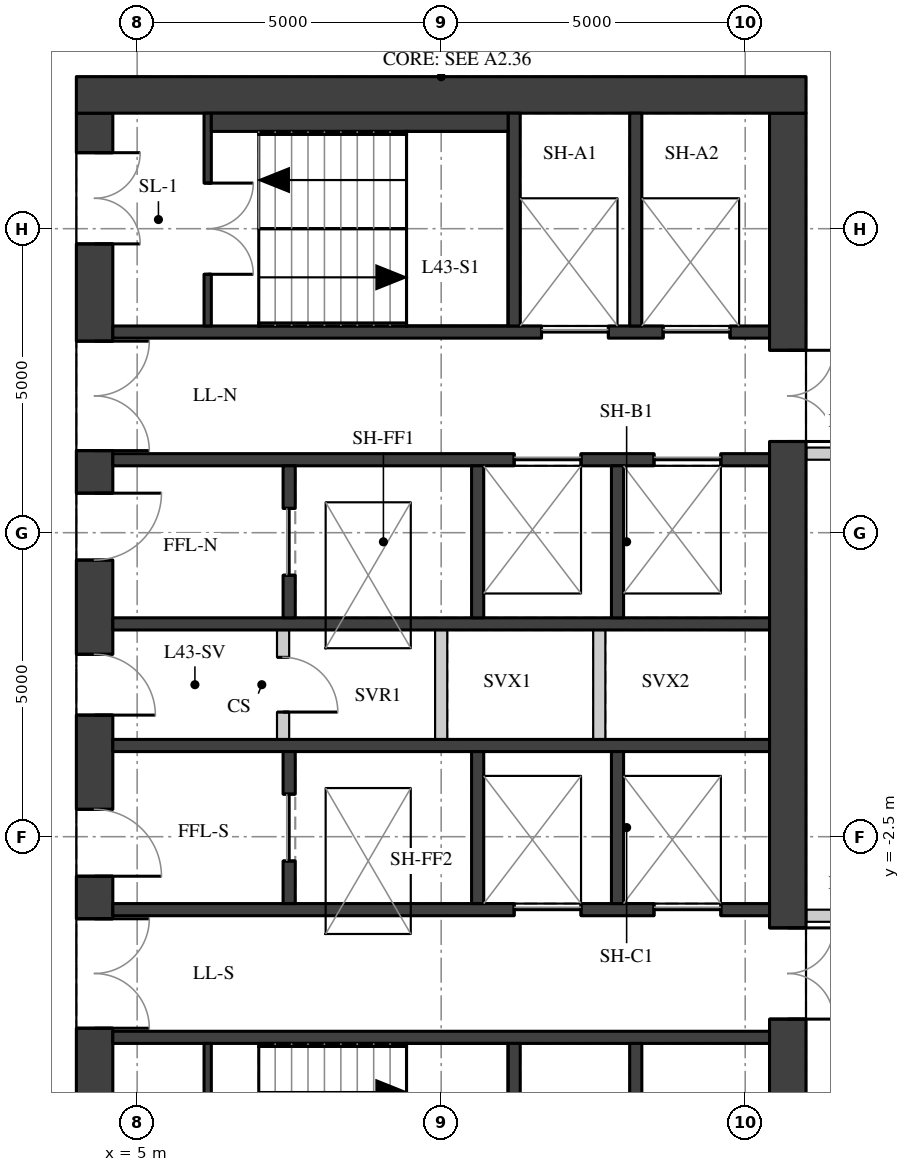
"""IFC4 building model, lengths in metres.
Left out: names, types, materials, properties, quantities, classifications, styles, units other than length and angle.
Written with IfcOpenShell. Run it as: python <this file> out.ifc"""

import sys

from ifc_helpers import new_model, si_unit, direction, frame, frame_2d, origin, place, context, subcontext, project, spatial, rectangle, extrude, element, fill, save


model = new_model("IFC4")
c1 = context("Model", 3, precision=1e-05, world=origin(), true_north=direction((0.0, 1.0)))
c2 = subcontext(c1, "Body", "Model", "MODEL_VIEW")
j1 = project(units=[si_unit("LENGTHUNIT", "METRE"), si_unit("PLANEANGLEUNIT", "RADIAN")], contexts=[c1])
p1 = place(None, origin())
s1 = spatial("IfcSite", under=j1, at=p1, CompositionType="ELEMENT")
p2 = place(p1, origin())
s2 = spatial("IfcBuilding", under=s1, at=p2, CompositionType="ELEMENT")
p3 = place(p2, frame((0.0, 0.0, 155.0)))
s3 = spatial("IfcBuildingStorey", under=s2, at=p3, CompositionType="ELEMENT", Elevation=155.0)
p4 = place(p3, frame((4.3, -9.4, 0.0), z_axis=(0.0, 0.0, 1.0), x_axis=(0.0, 1.0, 0.0)))
e1 = element("IfcWall", 1, at=p4, inside=s3, PredefinedType="SHEAR", context=c2, shape_type="SweptSolid", body=[
    extrude(rectangle(XDim=18.8, YDim=0.6, at=frame_2d((9.4, 0.0))), origin(), (0.0, 0.0, 1.0), 3.02),
])
p5 = place(p4, frame((0.65, 0.0, 0.0)))
e2 = element("IfcOpeningElement", 2, at=p5, cuts=e1, PredefinedType="OPENING", context=c2, shape_type="SweptSolid", body=[
    extrude(rectangle(XDim=1.5, YDim=2.1, at=frame_2d((0.75, 1.05))), frame((0.0, 0.31, 0.0), z_axis=(0.0, -1.0, 0.0), x_axis=(1.0, 0.0, 0.0)), (0.0, 0.0, 1.0), 0.62),
])
p6 = place(p4, frame((3.75, 0.0, 0.0)))
e3 = element("IfcOpeningElement", 3, at=p6, cuts=e1, PredefinedType="OPENING", context=c2, shape_type="SweptSolid", body=[
    extrude(rectangle(XDim=1.8, YDim=2.1, at=frame_2d((0.9, 1.05))), frame((0.0, 0.31, 0.0), z_axis=(0.0, -1.0, 0.0), x_axis=(1.0, 0.0, 0.0)), (0.0, 0.0, 1.0), 0.62),
])
p7 = place(p4, frame((6.25, 0.0, 0.0)))
e4 = element("IfcOpeningElement", 4, at=p7, cuts=e1, PredefinedType="OPENING", context=c2, shape_type="SweptSolid", body=[
    extrude(rectangle(XDim=1.1, YDim=2.1, at=frame_2d((0.55, 1.05))), frame((0.0, 0.31, 0.0), z_axis=(0.0, -1.0, 0.0), x_axis=(1.0, 0.0, 0.0)), (0.0, 0.0, 1.0), 0.62),
])
p8 = place(p4, frame((8.9, 0.0, 0.0)))
e5 = element("IfcOpeningElement", 5, at=p8, cuts=e1, PredefinedType="OPENING", context=c2, shape_type="SweptSolid", body=[
    extrude(rectangle(XDim=1.0, YDim=2.1, at=frame_2d((0.5, 1.05))), frame((0.0, 0.31, 0.0), z_axis=(0.0, -1.0, 0.0), x_axis=(1.0, 0.0, 0.0)), (0.0, 0.0, 1.0), 0.62),
])
p9 = place(p4, frame((11.45, 0.0, 0.0)))
e6 = element("IfcOpeningElement", 6, at=p9, cuts=e1, PredefinedType="OPENING", context=c2, shape_type="SweptSolid", body=[
    extrude(rectangle(XDim=1.1, YDim=2.1, at=frame_2d((0.55, 1.05))), frame((0.0, 0.31, 0.0), z_axis=(0.0, -1.0, 0.0), x_axis=(1.0, 0.0, 0.0)), (0.0, 0.0, 1.0), 0.62),
])
p10 = place(p4, frame((13.25, 0.0, 0.0)))
e7 = element("IfcOpeningElement", 7, at=p10, cuts=e1, PredefinedType="OPENING", context=c2, shape_type="SweptSolid", body=[
    extrude(rectangle(XDim=1.8, YDim=2.1, at=frame_2d((0.9, 1.05))), frame((0.0, 0.31, 0.0), z_axis=(0.0, -1.0, 0.0), x_axis=(1.0, 0.0, 0.0)), (0.0, 0.0, 1.0), 0.62),
])
p11 = place(p4, frame((16.65, 0.0, 0.0)))
e8 = element("IfcOpeningElement", 8, at=p11, cuts=e1, PredefinedType="OPENING", context=c2, shape_type="SweptSolid", body=[
    extrude(rectangle(XDim=1.5, YDim=2.1, at=frame_2d((0.75, 1.05))), frame((0.0, 0.31, 0.0), z_axis=(0.0, -1.0, 0.0), x_axis=(1.0, 0.0, 0.0)), (0.0, 0.0, 1.0), 0.62),
])
p12 = place(p3, frame((15.7, -9.4, 0.0), z_axis=(0.0, 0.0, 1.0), x_axis=(0.0, 1.0, 0.0)))
e9 = element("IfcWall", 9, at=p12, inside=s3, PredefinedType="SHEAR", context=c2, shape_type="SweptSolid", body=[
    extrude(rectangle(XDim=18.8, YDim=0.6, at=frame_2d((9.4, 0.0))), origin(), (0.0, 0.0, 1.0), 3.02),
])
p13 = place(p12, frame((13.4, 0.0, 0.0)))
e10 = element("IfcOpeningElement", 10, at=p13, cuts=e9, PredefinedType="OPENING", context=c2, shape_type="SweptSolid", body=[
    extrude(rectangle(XDim=1.5, YDim=2.1, at=frame_2d((0.75, 1.05))), frame((0.0, 0.31, 0.0), z_axis=(0.0, -1.0, 0.0), x_axis=(1.0, 0.0, 0.0)), (0.0, 0.0, 1.0), 0.62),
])
p14 = place(p12, frame((3.9, 0.0, 0.0)))
e11 = element("IfcOpeningElement", 11, at=p14, cuts=e9, PredefinedType="OPENING", context=c2, shape_type="SweptSolid", body=[
    extrude(rectangle(XDim=1.5, YDim=2.1, at=frame_2d((0.75, 1.05))), frame((0.0, 0.31, 0.0), z_axis=(0.0, -1.0, 0.0), x_axis=(1.0, 0.0, 0.0)), (0.0, 0.0, 1.0), 0.62),
])
p15 = place(p3, frame((4.0, 9.7, 0.0), z_axis=(0.0, 0.0, 1.0), x_axis=(1.0, 0.0, 0.0)))
e12 = element("IfcWall", 12, at=p15, inside=s3, PredefinedType="SHEAR", context=c2, shape_type="SweptSolid", body=[
    extrude(rectangle(XDim=12.0, YDim=0.6, at=frame_2d((6.0, 0.0))), origin(), (0.0, 0.0, 1.0), 3.02),
])
p16 = place(p3, frame((4.6, 5.8, 0.0), z_axis=(0.0, 0.0, 1.0), x_axis=(1.0, 0.0, 0.0)))
e13 = element("IfcWall", 13, at=p16, inside=s3, PredefinedType="SHEAR", context=c2, shape_type="SweptSolid", body=[
    extrude(rectangle(XDim=10.8, YDim=0.2, at=frame_2d((5.4, 0.0))), origin(), (0.0, 0.0, 1.0), 3.02),
])
p17 = place(p16, frame((7.05, 0.0, 0.0)))
e14 = element("IfcOpeningElement", 14, at=p17, cuts=e13, PredefinedType="OPENING", context=c2, shape_type="SweptSolid", body=[
    extrude(rectangle(XDim=1.1, YDim=2.1, at=frame_2d((0.55, 1.05))), frame((0.0, 0.11, 0.0), z_axis=(0.0, -1.0, 0.0), x_axis=(1.0, 0.0, 0.0)), (0.0, 0.0, 1.0), 0.22),
])
p18 = place(p16, frame((9.05, 0.0, 0.0)))
e15 = element("IfcOpeningElement", 15, at=p18, cuts=e13, PredefinedType="OPENING", context=c2, shape_type="SweptSolid", body=[
    extrude(rectangle(XDim=1.1, YDim=2.1, at=frame_2d((0.55, 1.05))), frame((0.0, 0.11, 0.0), z_axis=(0.0, -1.0, 0.0), x_axis=(1.0, 0.0, 0.0)), (0.0, 0.0, 1.0), 0.22),
])
p19 = place(p3, frame((4.6, 3.7, 0.0), z_axis=(0.0, 0.0, 1.0), x_axis=(1.0, 0.0, 0.0)))
e16 = element("IfcWall", 16, at=p19, inside=s3, PredefinedType="SHEAR", context=c2, shape_type="SweptSolid", body=[
    extrude(rectangle(XDim=10.8, YDim=0.2, at=frame_2d((5.4, 0.0))), origin(), (0.0, 0.0, 1.0), 3.02),
])
p20 = place(p19, frame((6.6, 0.0, 0.0)))
e17 = element("IfcOpeningElement", 17, at=p20, cuts=e16, PredefinedType="OPENING", context=c2, shape_type="SweptSolid", body=[
    extrude(rectangle(XDim=1.1, YDim=2.1, at=frame_2d((0.55, 1.05))), frame((0.0, 0.11, 0.0), z_axis=(0.0, -1.0, 0.0), x_axis=(1.0, 0.0, 0.0)), (0.0, 0.0, 1.0), 0.22),
])
p21 = place(p19, frame((8.9, 0.0, 0.0)))
e18 = element("IfcOpeningElement", 18, at=p21, cuts=e16, PredefinedType="OPENING", context=c2, shape_type="SweptSolid", body=[
    extrude(rectangle(XDim=1.1, YDim=2.1, at=frame_2d((0.55, 1.05))), frame((0.0, 0.11, 0.0), z_axis=(0.0, -1.0, 0.0), x_axis=(1.0, 0.0, 0.0)), (0.0, 0.0, 1.0), 0.22),
])
for number, where, z_axis, x_axis in (
    (19, (4.6, 1.0, 0.0), (0.0, 0.0, 1.0), (1.0, 0.0, 0.0)),
    (20, (4.6, -1.0, 0.0), (0.0, 0.0, 1.0), (1.0, 0.0, 0.0)),
):
    element("IfcWall", number, at=place(p3, frame(where, z_axis=z_axis, x_axis=x_axis)), inside=s3, PredefinedType="SHEAR", context=c2, shape_type="SweptSolid", body=[
        extrude(rectangle(XDim=10.8, YDim=0.2, at=frame_2d((5.4, 0.0))), origin(), (0.0, 0.0, 1.0), 3.02),
    ])
p22 = place(p3, frame((4.6, -3.7, 0.0), z_axis=(0.0, 0.0, 1.0), x_axis=(1.0, 0.0, 0.0)))
e21 = element("IfcWall", 21, at=p22, inside=s3, PredefinedType="SHEAR", context=c2, shape_type="SweptSolid", body=[
    extrude(rectangle(XDim=10.8, YDim=0.2, at=frame_2d((5.4, 0.0))), origin(), (0.0, 0.0, 1.0), 3.02),
])
p23 = place(p22, frame((6.6, 0.0, 0.0)))
e22 = element("IfcOpeningElement", 22, at=p23, cuts=e21, PredefinedType="OPENING", context=c2, shape_type="SweptSolid", body=[
    extrude(rectangle(XDim=1.1, YDim=2.1, at=frame_2d((0.55, 1.05))), frame((0.0, 0.11, 0.0), z_axis=(0.0, -1.0, 0.0), x_axis=(1.0, 0.0, 0.0)), (0.0, 0.0, 1.0), 0.22),
])
p24 = place(p22, frame((8.9, 0.0, 0.0)))
e23 = element("IfcOpeningElement", 23, at=p24, cuts=e21, PredefinedType="OPENING", context=c2, shape_type="SweptSolid", body=[
    extrude(rectangle(XDim=1.1, YDim=2.1, at=frame_2d((0.55, 1.05))), frame((0.0, 0.11, 0.0), z_axis=(0.0, -1.0, 0.0), x_axis=(1.0, 0.0, 0.0)), (0.0, 0.0, 1.0), 0.22),
])
p25 = place(p3, frame((4.6, -5.8, 0.0), z_axis=(0.0, 0.0, 1.0), x_axis=(1.0, 0.0, 0.0)))
e24 = element("IfcWall", 24, at=p25, inside=s3, PredefinedType="SHEAR", context=c2, shape_type="SweptSolid", body=[
    extrude(rectangle(XDim=10.8, YDim=0.2, at=frame_2d((5.4, 0.0))), origin(), (0.0, 0.0, 1.0), 3.02),
])
for number, where, z_axis, x_axis in (
    (25, (11.2, 5.9, 0.0), (0.0, 0.0, 1.0), (0.0, 1.0, 0.0)),
    (26, (11.2, -9.4, 0.0), (0.0, 0.0, 1.0), (0.0, 1.0, 0.0)),
    (27, (13.2, 5.9, 0.0), (0.0, 0.0, 1.0), (0.0, 1.0, 0.0)),
    (28, (13.2, -9.4, 0.0), (0.0, 0.0, 1.0), (0.0, 1.0, 0.0)),
):
    element("IfcWall", number, at=place(p3, frame(where, z_axis=z_axis, x_axis=x_axis)), inside=s3, PredefinedType="SHEAR", context=c2, shape_type="SweptSolid", body=[
        extrude(rectangle(XDim=3.5, YDim=0.2, at=frame_2d((1.75, 0.0))), origin(), (0.0, 0.0, 1.0), 3.02),
    ])
p26 = place(p3, frame((7.5, 1.1, 0.0), z_axis=(0.0, 0.0, 1.0), x_axis=(0.0, 1.0, 0.0)))
e29 = element("IfcWall", 29, at=p26, inside=s3, PredefinedType="SHEAR", context=c2, shape_type="SweptSolid", body=[
    extrude(rectangle(XDim=2.5, YDim=0.2, at=frame_2d((1.25, 0.0))), origin(), (0.0, 0.0, 1.0), 3.02),
])
p27 = place(p26, frame((0.7, 0.0, 0.0)))
e30 = element("IfcOpeningElement", 30, at=p27, cuts=e29, PredefinedType="OPENING", context=c2, shape_type="SweptSolid", body=[
    extrude(rectangle(XDim=1.1, YDim=2.1, at=frame_2d((0.55, 1.05))), frame((0.0, 0.11, 0.0), z_axis=(0.0, -1.0, 0.0), x_axis=(1.0, 0.0, 0.0)), (0.0, 0.0, 1.0), 0.22),
])
p28 = place(p3, frame((7.5, -3.6, 0.0), z_axis=(0.0, 0.0, 1.0), x_axis=(0.0, 1.0, 0.0)))
e31 = element("IfcWall", 31, at=p28, inside=s3, PredefinedType="SHEAR", context=c2, shape_type="SweptSolid", body=[
    extrude(rectangle(XDim=2.5, YDim=0.2, at=frame_2d((1.25, 0.0))), origin(), (0.0, 0.0, 1.0), 3.02),
])
p29 = place(p28, frame((0.7, 0.0, 0.0)))
e32 = element("IfcOpeningElement", 32, at=p29, cuts=e31, PredefinedType="OPENING", context=c2, shape_type="SweptSolid", body=[
    extrude(rectangle(XDim=1.1, YDim=2.1, at=frame_2d((0.55, 1.05))), frame((0.0, 0.11, 0.0), z_axis=(0.0, -1.0, 0.0), x_axis=(1.0, 0.0, 0.0)), (0.0, 0.0, 1.0), 0.22),
])
for number, where, z_axis, x_axis in (
    (33, (10.6, 1.1, 0.0), (0.0, 0.0, 1.0), (0.0, 1.0, 0.0)),
    (34, (10.6, -3.6, 0.0), (0.0, 0.0, 1.0), (0.0, 1.0, 0.0)),
    (35, (12.9, 1.1, 0.0), (0.0, 0.0, 1.0), (0.0, 1.0, 0.0)),
    (36, (12.9, -3.6, 0.0), (0.0, 0.0, 1.0), (0.0, 1.0, 0.0)),
):
    element("IfcWall", number, at=place(p3, frame(where, z_axis=z_axis, x_axis=x_axis)), inside=s3, PredefinedType="SHEAR", context=c2, shape_type="SweptSolid", body=[
        extrude(rectangle(XDim=2.5, YDim=0.2, at=frame_2d((1.25, 0.0))), origin(), (0.0, 0.0, 1.0), 3.02),
    ])
p30 = place(p3, frame((6.16, 5.9, 0.0), z_axis=(0.0, 0.0, 1.0), x_axis=(0.0, 1.0, 0.0)))
e37 = element("IfcWall", 37, at=p30, inside=s3, PredefinedType="SHEAR", context=c2, shape_type="SweptSolid", body=[
    extrude(rectangle(XDim=3.5, YDim=0.12, at=frame_2d((1.75, 0.0))), origin(), (0.0, 0.0, 1.0), 3.02),
])
p31 = place(p30, frame((0.85, 0.0, 0.0)))
e38 = element("IfcOpeningElement", 38, at=p31, cuts=e37, PredefinedType="OPENING", context=c2, shape_type="SweptSolid", body=[
    extrude(rectangle(XDim=1.5, YDim=2.1, at=frame_2d((0.75, 1.05))), frame((0.0, 0.07, 0.0), z_axis=(0.0, -1.0, 0.0), x_axis=(1.0, 0.0, 0.0)), (0.0, 0.0, 1.0), 0.14),
])
p32 = place(p3, frame((6.16, -9.4, 0.0), z_axis=(0.0, 0.0, 1.0), x_axis=(0.0, 1.0, 0.0)))
e39 = element("IfcWall", 39, at=p32, inside=s3, PredefinedType="SHEAR", context=c2, shape_type="SweptSolid", body=[
    extrude(rectangle(XDim=3.5, YDim=0.12, at=frame_2d((1.75, 0.0))), origin(), (0.0, 0.0, 1.0), 3.02),
])
p33 = place(p32, frame((1.15, 0.0, 0.0)))
e40 = element("IfcOpeningElement", 40, at=p33, cuts=e39, PredefinedType="OPENING", context=c2, shape_type="SweptSolid", body=[
    extrude(rectangle(XDim=1.5, YDim=2.1, at=frame_2d((0.75, 1.05))), frame((0.0, 0.07, 0.0), z_axis=(0.0, -1.0, 0.0), x_axis=(1.0, 0.0, 0.0)), (0.0, 0.0, 1.0), 0.14),
])
p34 = place(p3, frame((7.4, -0.9, 0.0), z_axis=(0.0, 0.0, 1.0), x_axis=(0.0, 1.0, 0.0)))
e41 = element("IfcWall", 41, at=p34, inside=s3, PredefinedType="PARTITIONING", context=c2, shape_type="SweptSolid", body=[
    extrude(rectangle(XDim=1.8, YDim=0.2, at=frame_2d((0.9, 0.0))), origin(), (0.0, 0.0, 1.0), 3.02),
])
p35 = place(p34, frame((0.45, 0.0, 0.0)))
e42 = element("IfcOpeningElement", 42, at=p35, cuts=e41, PredefinedType="OPENING", context=c2, shape_type="SweptSolid", body=[
    extrude(rectangle(XDim=0.9, YDim=2.1, at=frame_2d((0.45, 1.05))), frame((0.0, 0.11, 0.0), z_axis=(0.0, -1.0, 0.0), x_axis=(1.0, 0.0, 0.0)), (0.0, 0.0, 1.0), 0.22),
])
for number, where, z_axis, x_axis in (
    (43, (10.0, -0.9, 0.0), (0.0, 0.0, 1.0), (0.0, 1.0, 0.0)),
    (44, (12.6, -0.9, 0.0), (0.0, 0.0, 1.0), (0.0, 1.0, 0.0)),
):
    element("IfcWall", number, at=place(p3, frame(where, z_axis=z_axis, x_axis=x_axis)), inside=s3, PredefinedType="PARTITIONING", context=c2, shape_type="SweptSolid", body=[
        extrude(rectangle(XDim=1.8, YDim=0.2, at=frame_2d((0.9, 0.0))), origin(), (0.0, 0.0, 1.0), 3.02),
    ])
p36 = place(p3, frame((6.22, 9.25, 0.0), z_axis=(0.0, 0.0, 1.0), x_axis=(1.0, 0.0, 0.0)))
e45 = element("IfcWall", 45, at=p36, inside=s3, PredefinedType="PARTITIONING", context=c2, shape_type="SweptSolid", body=[
    extrude(rectangle(XDim=4.88, YDim=0.3, at=frame_2d((2.44, 0.0))), origin(), (0.0, 0.0, 1.0), 3.02),
])
for number, where, z_axis, x_axis in (
    (46, (17.6, 3.8, 0.0), (0.0, 0.0, 1.0), (-1.0, 0.0, 0.0)),
    (47, (16.004, -3.8, 0.0), (0.0, 0.0, 1.0), (1.0, 0.0, 0.0)),
):
    element("IfcWall", number, at=place(p3, frame(where, z_axis=z_axis, x_axis=x_axis)), inside=s3, PredefinedType="PARTITIONING", context=c2, shape_type="SweptSolid", body=[
        extrude(rectangle(XDim=1.596, YDim=0.2, at=frame_2d((0.798, 0.0))), origin(), (0.0, 0.0, 1.0), 2.57),
    ])
p37 = place(p6, origin())
e48 = element("IfcDoor", 48, at=p37, inside=s3, OperationType="DOUBLE_DOOR_SINGLE_SWING", PredefinedType="DOOR", context=c2, shape_type="SweptSolid", body=[
    extrude(rectangle(XDim=1.8, YDim=2.1, at=frame_2d((0.9, 1.05))), frame((0.0, 0.025, 0.0), z_axis=(0.0, -1.0, 0.0), x_axis=(1.0, 0.0, 0.0)), (0.0, 0.0, 1.0), 0.05),
])
fill(e3, e48)
p38 = place(p7, origin())
e49 = element("IfcDoor", 49, at=p38, inside=s3, OperationType="SINGLE_SWING_RIGHT", PredefinedType="DOOR", context=c2, shape_type="SweptSolid", body=[
    extrude(rectangle(XDim=1.1, YDim=2.1, at=frame_2d((0.55, 1.05))), frame((0.0, 0.025, 0.0), z_axis=(0.0, -1.0, 0.0), x_axis=(1.0, 0.0, 0.0)), (0.0, 0.0, 1.0), 0.05),
])
fill(e4, e49)
p39 = place(p8, origin())
e50 = element("IfcDoor", 50, at=p39, inside=s3, OperationType="SINGLE_SWING_RIGHT", PredefinedType="DOOR", context=c2, shape_type="SweptSolid", body=[
    extrude(rectangle(XDim=1.0, YDim=2.1, at=frame_2d((0.5, 1.05))), frame((0.0, 0.025, 0.0), z_axis=(0.0, -1.0, 0.0), x_axis=(1.0, 0.0, 0.0)), (0.0, 0.0, 1.0), 0.05),
])
fill(e5, e50)
p40 = place(p9, origin())
e51 = element("IfcDoor", 51, at=p40, inside=s3, OperationType="SINGLE_SWING_LEFT", PredefinedType="DOOR", context=c2, shape_type="SweptSolid", body=[
    extrude(rectangle(XDim=1.1, YDim=2.1, at=frame_2d((0.55, 1.05))), frame((0.0, 0.025, 0.0), z_axis=(0.0, -1.0, 0.0), x_axis=(1.0, 0.0, 0.0)), (0.0, 0.0, 1.0), 0.05),
])
fill(e6, e51)
p41 = place(p10, origin())
e52 = element("IfcDoor", 52, at=p41, inside=s3, OperationType="DOUBLE_DOOR_SINGLE_SWING", PredefinedType="DOOR", context=c2, shape_type="SweptSolid", body=[
    extrude(rectangle(XDim=1.8, YDim=2.1, at=frame_2d((0.9, 1.05))), frame((0.0, 0.025, 0.0), z_axis=(0.0, -1.0, 0.0), x_axis=(1.0, 0.0, 0.0)), (0.0, 0.0, 1.0), 0.05),
])
fill(e7, e52)
p42 = place(p11, origin())
e53 = element("IfcDoor", 53, at=p42, inside=s3, OperationType="DOUBLE_DOOR_SINGLE_SWING", PredefinedType="DOOR", context=c2, shape_type="SweptSolid", body=[
    extrude(rectangle(XDim=1.5, YDim=2.1, at=frame_2d((0.75, 1.05))), frame((0.0, 0.025, 0.0), z_axis=(0.0, -1.0, 0.0), x_axis=(1.0, 0.0, 0.0)), (0.0, 0.0, 1.0), 0.05),
])
fill(e8, e53)
p43 = place(p13, origin())
e54 = element("IfcDoor", 54, at=p43, inside=s3, OperationType="DOUBLE_DOOR_SINGLE_SWING", PredefinedType="DOOR", context=c2, shape_type="SweptSolid", body=[
    extrude(rectangle(XDim=1.5, YDim=2.1, at=frame_2d((0.75, 1.05))), frame((0.0, 0.025, 0.0), z_axis=(0.0, -1.0, 0.0), x_axis=(1.0, 0.0, 0.0)), (0.0, 0.0, 1.0), 0.05),
])
fill(e10, e54)
p44 = place(p14, origin())
e55 = element("IfcDoor", 55, at=p44, inside=s3, OperationType="DOUBLE_DOOR_SINGLE_SWING", PredefinedType="DOOR", context=c2, shape_type="SweptSolid", body=[
    extrude(rectangle(XDim=1.5, YDim=2.1, at=frame_2d((0.75, 1.05))), frame((0.0, 0.025, 0.0), z_axis=(0.0, -1.0, 0.0), x_axis=(1.0, 0.0, 0.0)), (0.0, 0.0, 1.0), 0.05),
])
fill(e11, e55)
p45 = place(p31, origin())
e56 = element("IfcDoor", 56, at=p45, inside=s3, OperationType="DOUBLE_DOOR_SINGLE_SWING", PredefinedType="DOOR", context=c2, shape_type="SweptSolid", body=[
    extrude(rectangle(XDim=1.5, YDim=2.1, at=frame_2d((0.75, 1.05))), frame((0.0, 0.025, 0.0), z_axis=(0.0, -1.0, 0.0), x_axis=(1.0, 0.0, 0.0)), (0.0, 0.0, 1.0), 0.05),
])
fill(e38, e56)
p46 = place(p17, origin())
e57 = element("IfcDoor", 57, at=p46, inside=s3, OperationType="DOUBLE_DOOR_SLIDING", PredefinedType="DOOR", context=c2, shape_type="SweptSolid", body=[
    extrude(rectangle(XDim=1.1, YDim=2.1, at=frame_2d((0.55, 1.05))), frame((0.0, 0.025, 0.0), z_axis=(0.0, -1.0, 0.0), x_axis=(1.0, 0.0, 0.0)), (0.0, 0.0, 1.0), 0.05),
])
fill(e14, e57)
p47 = place(p18, origin())
e58 = element("IfcDoor", 58, at=p47, inside=s3, OperationType="DOUBLE_DOOR_SLIDING", PredefinedType="DOOR", context=c2, shape_type="SweptSolid", body=[
    extrude(rectangle(XDim=1.1, YDim=2.1, at=frame_2d((0.55, 1.05))), frame((0.0, 0.025, 0.0), z_axis=(0.0, -1.0, 0.0), x_axis=(1.0, 0.0, 0.0)), (0.0, 0.0, 1.0), 0.05),
])
fill(e15, e58)
p48 = place(p20, origin())
e59 = element("IfcDoor", 59, at=p48, inside=s3, OperationType="DOUBLE_DOOR_SLIDING", PredefinedType="DOOR", context=c2, shape_type="SweptSolid", body=[
    extrude(rectangle(XDim=1.1, YDim=2.1, at=frame_2d((0.55, 1.05))), frame((0.0, 0.025, 0.0), z_axis=(0.0, -1.0, 0.0), x_axis=(1.0, 0.0, 0.0)), (0.0, 0.0, 1.0), 0.05),
])
fill(e17, e59)
p49 = place(p21, origin())
e60 = element("IfcDoor", 60, at=p49, inside=s3, OperationType="DOUBLE_DOOR_SLIDING", PredefinedType="DOOR", context=c2, shape_type="SweptSolid", body=[
    extrude(rectangle(XDim=1.1, YDim=2.1, at=frame_2d((0.55, 1.05))), frame((0.0, 0.025, 0.0), z_axis=(0.0, -1.0, 0.0), x_axis=(1.0, 0.0, 0.0)), (0.0, 0.0, 1.0), 0.05),
])
fill(e18, e60)
p50 = place(p23, origin())
e61 = element("IfcDoor", 61, at=p50, inside=s3, OperationType="DOUBLE_DOOR_SLIDING", PredefinedType="DOOR", context=c2, shape_type="SweptSolid", body=[
    extrude(rectangle(XDim=1.1, YDim=2.1, at=frame_2d((0.55, 1.05))), frame((0.0, 0.025, 0.0), z_axis=(0.0, -1.0, 0.0), x_axis=(1.0, 0.0, 0.0)), (0.0, 0.0, 1.0), 0.05),
])
fill(e22, e61)
p51 = place(p24, origin())
e62 = element("IfcDoor", 62, at=p51, inside=s3, OperationType="DOUBLE_DOOR_SLIDING", PredefinedType="DOOR", context=c2, shape_type="SweptSolid", body=[
    extrude(rectangle(XDim=1.1, YDim=2.1, at=frame_2d((0.55, 1.05))), frame((0.0, 0.025, 0.0), z_axis=(0.0, -1.0, 0.0), x_axis=(1.0, 0.0, 0.0)), (0.0, 0.0, 1.0), 0.05),
])
fill(e23, e62)
p52 = place(p27, origin())
e63 = element("IfcDoor", 63, at=p52, inside=s3, OperationType="DOUBLE_DOOR_SLIDING", PredefinedType="DOOR", context=c2, shape_type="SweptSolid", body=[
    extrude(rectangle(XDim=1.1, YDim=2.1, at=frame_2d((0.55, 1.05))), frame((0.0, 0.025, 0.0), z_axis=(0.0, -1.0, 0.0), x_axis=(1.0, 0.0, 0.0)), (0.0, 0.0, 1.0), 0.05),
])
fill(e30, e63)
p53 = place(p29, origin())
e64 = element("IfcDoor", 64, at=p53, inside=s3, OperationType="DOUBLE_DOOR_SLIDING", PredefinedType="DOOR", context=c2, shape_type="SweptSolid", body=[
    extrude(rectangle(XDim=1.1, YDim=2.1, at=frame_2d((0.55, 1.05))), frame((0.0, 0.025, 0.0), z_axis=(0.0, -1.0, 0.0), x_axis=(1.0, 0.0, 0.0)), (0.0, 0.0, 1.0), 0.05),
])
fill(e32, e64)
p54 = place(p35, origin())
e65 = element("IfcDoor", 65, at=p54, inside=s3, OperationType="SINGLE_SWING_RIGHT", PredefinedType="DOOR", context=c2, shape_type="SweptSolid", body=[
    extrude(rectangle(XDim=0.9, YDim=2.1, at=frame_2d((0.45, 1.05))), frame((0.0, 0.025, 0.0), z_axis=(0.0, -1.0, 0.0), x_axis=(1.0, 0.0, 0.0)), (0.0, 0.0, 1.0), 0.05),
])
fill(e42, e65)
save(model, sys.argv[1])
